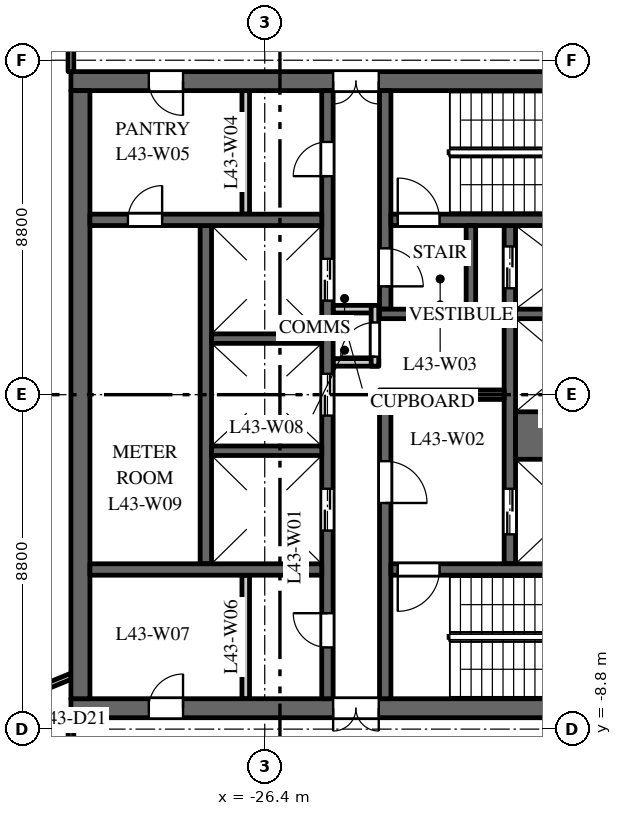
"""IFC4 building model, lengths in metres.
Left out: names, types, materials, properties, quantities, classifications, styles, units other than length and angle.
Written with IfcOpenShell. Run it as: python <this file> out.ifc"""

import sys

from ifc_helpers import new_model, si_unit, direction, frame, frame_2d, origin, place, context, subcontext, project, spatial, rectangle, extrude, element, fill, save


model = new_model("IFC4")
c1 = context("Model", 3, precision=1e-05, world=origin(), true_north=direction((0.0, 1.0)))
c2 = subcontext(c1, "Body", "Model", "MODEL_VIEW")
j1 = project(units=[si_unit("LENGTHUNIT", "METRE"), si_unit("PLANEANGLEUNIT", "RADIAN")], contexts=[c1])
p1 = place(None, origin())
s1 = spatial("IfcSite", under=j1, at=p1, CompositionType="ELEMENT")
p2 = place(p1, origin())
s2 = spatial("IfcBuilding", under=s1, at=p2, CompositionType="ELEMENT")
p3 = place(p2, frame((0.0, 0.0, 186.0)))
s3 = spatial("IfcBuildingStorey", under=s2, at=p3, CompositionType="ELEMENT", Elevation=186.0)
p4 = place(p3, frame((-16.5, 8.25, 0.0), z_axis=(0.0, 0.0, 1.0), x_axis=(-1.0, 0.0, 0.0)))
e1 = element("IfcWall", 1, at=p4, inside=s3, PredefinedType="SHEAR", context=c2, shape_type="SweptSolid", body=[
    extrude(rectangle(XDim=15.0, YDim=0.5, at=frame_2d((7.5, 0.0))), origin(), (0.0, 0.0, 1.0), 3.7),
])
p5 = place(p4, frame((6.9, 0.0, 0.0)))
e2 = element("IfcOpeningElement", 2, at=p5, cuts=e1, PredefinedType="OPENING", context=c2, shape_type="SweptSolid", body=[
    extrude(rectangle(XDim=1.2, YDim=2.1, at=frame_2d((0.6, 1.05))), frame((0.0, 0.26, 0.0), z_axis=(0.0, -1.0, 0.0), x_axis=(1.0, 0.0, 0.0)), (0.0, 0.0, 1.0), 0.52),
])
p6 = place(p4, frame((12.05, 0.0, 0.0)))
e3 = element("IfcOpeningElement", 3, at=p6, cuts=e1, PredefinedType="OPENING", context=c2, shape_type="SweptSolid", body=[
    extrude(rectangle(XDim=0.9, YDim=2.1, at=frame_2d((0.45, 1.05))), frame((0.0, 0.26, 0.0), z_axis=(0.0, -1.0, 0.0), x_axis=(1.0, 0.0, 0.0)), (0.0, 0.0, 1.0), 0.52),
])
p7 = place(p3, frame((-16.5, -8.25, 0.0), z_axis=(0.0, 0.0, 1.0), x_axis=(-1.0, 0.0, 0.0)))
e4 = element("IfcWall", 4, at=p7, inside=s3, PredefinedType="SHEAR", context=c2, shape_type="SweptSolid", body=[
    extrude(rectangle(XDim=15.0, YDim=0.5, at=frame_2d((7.5, 0.0))), origin(), (0.0, 0.0, 1.0), 3.7),
])
p8 = place(p7, frame((6.9, 0.0, 0.0)))
e5 = element("IfcOpeningElement", 5, at=p8, cuts=e4, PredefinedType="OPENING", context=c2, shape_type="SweptSolid", body=[
    extrude(rectangle(XDim=1.2, YDim=2.1, at=frame_2d((0.6, 1.05))), frame((0.0, 0.26, 0.0), z_axis=(0.0, -1.0, 0.0), x_axis=(1.0, 0.0, 0.0)), (0.0, 0.0, 1.0), 0.52),
])
p9 = place(p7, frame((12.05, 0.0, 0.0)))
e6 = element("IfcOpeningElement", 6, at=p9, cuts=e4, PredefinedType="OPENING", context=c2, shape_type="SweptSolid", body=[
    extrude(rectangle(XDim=0.9, YDim=2.1, at=frame_2d((0.45, 1.05))), frame((0.0, 0.26, 0.0), z_axis=(0.0, -1.0, 0.0), x_axis=(1.0, 0.0, 0.0)), (0.0, 0.0, 1.0), 0.52),
])
p10 = place(p3, frame((-27.95, -4.45, 0.0), z_axis=(0.0, 0.0, 1.0), x_axis=(0.0, 1.0, 0.0)))
e7 = element("IfcWall", 7, at=p10, inside=s3, PredefinedType="SHEAR", context=c2, shape_type="SweptSolid", body=[
    extrude(rectangle(XDim=8.9, YDim=0.3, at=frame_2d((4.45, 0.0))), origin(), (0.0, 0.0, 1.0), 3.7),
])
p11 = place(p3, frame((-19.95, -4.45, 0.0), z_axis=(0.0, 0.0, 1.0), x_axis=(0.0, 1.0, 0.0)))
e8 = element("IfcWall", 8, at=p11, inside=s3, PredefinedType="SHEAR", context=c2, shape_type="SweptSolid", body=[
    extrude(rectangle(XDim=8.9, YDim=0.3, at=frame_2d((4.45, 0.0))), origin(), (0.0, 0.0, 1.0), 3.7),
])
p12 = place(p11, frame((0.775, 0.0, 0.0)))
e9 = element("IfcOpeningElement", 9, at=p12, cuts=e8, PredefinedType="OPENING", context=c2, shape_type="SweptSolid", body=[
    extrude(rectangle(XDim=1.2, YDim=2.1, at=frame_2d((0.6, 1.05))), frame((0.0, 0.16, 0.0), z_axis=(0.0, -1.0, 0.0), x_axis=(1.0, 0.0, 0.0)), (0.0, 0.0, 1.0), 0.32),
])
p13 = place(p11, frame((7.25, 0.0, 0.0)))
e10 = element("IfcOpeningElement", 10, at=p13, cuts=e8, PredefinedType="OPENING", context=c2, shape_type="SweptSolid", body=[
    extrude(rectangle(XDim=1.1, YDim=2.1, at=frame_2d((0.55, 1.05))), frame((0.0, 0.16, 0.0), z_axis=(0.0, -1.0, 0.0), x_axis=(1.0, 0.0, 0.0)), (0.0, 0.0, 1.0), 0.32),
])
p14 = place(p3, frame((-24.75, -8.0, 0.0), z_axis=(0.0, 0.0, 1.0), x_axis=(0.0, 1.0, 0.0)))
e11 = element("IfcWall", 11, at=p14, inside=s3, PredefinedType="SHEAR", context=c2, shape_type="SweptSolid", body=[
    extrude(rectangle(XDim=16.0, YDim=0.3, at=frame_2d((8.0, 0.0))), origin(), (0.0, 0.0, 1.0), 3.7),
])
p15 = place(p14, frame((4.425, 0.0, 0.0)))
e12 = element("IfcOpeningElement", 12, at=p15, cuts=e11, PredefinedType="OPENING", context=c2, shape_type="SweptSolid", body=[
    extrude(rectangle(XDim=1.1, YDim=2.1, at=frame_2d((0.55, 1.05))), frame((0.0, 0.16, 0.0), z_axis=(0.0, -1.0, 0.0), x_axis=(1.0, 0.0, 0.0)), (0.0, 0.0, 1.0), 0.32),
])
p16 = place(p14, frame((7.45, 0.0, 0.0)))
e13 = element("IfcOpeningElement", 13, at=p16, cuts=e11, PredefinedType="OPENING", context=c2, shape_type="SweptSolid", body=[
    extrude(rectangle(XDim=1.1, YDim=2.1, at=frame_2d((0.55, 1.05))), frame((0.0, 0.16, 0.0), z_axis=(0.0, -1.0, 0.0), x_axis=(1.0, 0.0, 0.0)), (0.0, 0.0, 1.0), 0.32),
])
p17 = place(p14, frame((10.475, 0.0, 0.0)))
e14 = element("IfcOpeningElement", 14, at=p17, cuts=e11, PredefinedType="OPENING", context=c2, shape_type="SweptSolid", body=[
    extrude(rectangle(XDim=1.1, YDim=2.1, at=frame_2d((0.55, 1.05))), frame((0.0, 0.16, 0.0), z_axis=(0.0, -1.0, 0.0), x_axis=(1.0, 0.0, 0.0)), (0.0, 0.0, 1.0), 0.32),
])
p18 = place(p14, frame((13.75, 0.0, 0.0)))
e15 = element("IfcOpeningElement", 15, at=p18, cuts=e11, PredefinedType="OPENING", context=c2, shape_type="SweptSolid", body=[
    extrude(rectangle(XDim=0.9, YDim=2.1, at=frame_2d((0.45, 1.05))), frame((0.0, 0.16, 0.0), z_axis=(0.0, -1.0, 0.0), x_axis=(1.0, 0.0, 0.0)), (0.0, 0.0, 1.0), 0.32),
])
p19 = place(p14, frame((1.35, 0.0, 0.0)))
e16 = element("IfcOpeningElement", 16, at=p19, cuts=e11, PredefinedType="OPENING", context=c2, shape_type="SweptSolid", body=[
    extrude(rectangle(XDim=0.9, YDim=2.1, at=frame_2d((0.45, 1.05))), frame((0.0, 0.16, 0.0), z_axis=(0.0, -1.0, 0.0), x_axis=(1.0, 0.0, 0.0)), (0.0, 0.0, 1.0), 0.32),
])
p20 = place(p3, frame((-20.1, 0.0, 0.0), z_axis=(0.0, 0.0, 1.0), x_axis=(-1.0, 0.0, 0.0)))
e17 = element("IfcWall", 17, at=p20, inside=s3, PredefinedType="SHEAR", context=c2, shape_type="SweptSolid", body=[
    extrude(rectangle(XDim=3.28, YDim=0.25, at=frame_2d((1.64, 0.0))), origin(), (0.0, 0.0, 1.0), 3.7),
])
for number, where, z_axis, x_axis in (
    (18, (-23.4, 0.85, 0.0), (0.0, 0.0, 1.0), (-1.0, 0.0, 0.0)),
    (19, (-23.4, 2.25, 0.0), (0.0, 0.0, 1.0), (-1.0, 0.0, 0.0)),
):
    element("IfcWall", number, at=place(p3, frame(where, z_axis=z_axis, x_axis=x_axis)), inside=s3, PredefinedType="PARTITIONING", context=c2, shape_type="SweptSolid", body=[
        extrude(rectangle(XDim=1.2, YDim=0.2, at=frame_2d((0.6, 0.0))), origin(), (0.0, 0.0, 1.0), 3.7),
    ])
p21 = place(p3, frame((-23.5, 0.75, 0.0), z_axis=(0.0, 0.0, 1.0), x_axis=(0.0, 1.0, 0.0)))
e20 = element("IfcWall", 20, at=p21, inside=s3, PredefinedType="PARTITIONING", context=c2, shape_type="SweptSolid", body=[
    extrude(rectangle(XDim=1.6, YDim=0.2, at=frame_2d((0.8, 0.0))), origin(), (0.0, 0.0, 1.0), 3.7),
])
p22 = place(p21, frame((0.25, 0.0, 0.0)))
e21 = element("IfcOpeningElement", 21, at=p22, cuts=e20, PredefinedType="OPENING", context=c2, shape_type="SweptSolid", body=[
    extrude(rectangle(XDim=0.9, YDim=2.1, at=frame_2d((0.45, 1.05))), frame((0.0, 0.11, 0.0), z_axis=(0.0, -1.0, 0.0), x_axis=(1.0, 0.0, 0.0)), (0.0, 0.0, 1.0), 0.22),
])
p23 = place(p3, frame((-31.25, -8.0, 0.0), z_axis=(0.0, 0.0, 1.0), x_axis=(0.0, 1.0, 0.0)))
e22 = element("IfcWall", 22, at=p23, inside=s3, PredefinedType="SHEAR", context=c2, shape_type="SweptSolid", body=[
    extrude(rectangle(XDim=16.0, YDim=0.5, at=frame_2d((8.0, 0.0))), origin(), (0.0, 0.0, 1.0), 3.7),
])
p24 = place(p3, frame((-24.9, 4.6, 0.0), z_axis=(0.0, 0.0, 1.0), x_axis=(-1.0, 0.0, 0.0)))
e23 = element("IfcWall", 23, at=p24, inside=s3, PredefinedType="SHEAR", context=c2, shape_type="SweptSolid", body=[
    extrude(rectangle(XDim=6.1, YDim=0.3, at=frame_2d((3.05, 0.0))), origin(), (0.0, 0.0, 1.0), 3.7),
])
p25 = place(p24, frame((4.2, 0.0, 0.0)))
e24 = element("IfcOpeningElement", 24, at=p25, cuts=e23, PredefinedType="OPENING", context=c2, shape_type="SweptSolid", body=[
    extrude(rectangle(XDim=0.9, YDim=2.1, at=frame_2d((0.45, 1.05))), frame((0.0, 0.16, 0.0), z_axis=(0.0, -1.0, 0.0), x_axis=(1.0, 0.0, 0.0)), (0.0, 0.0, 1.0), 0.32),
])
for number, where, z_axis, x_axis in (
    (25, (-26.9, 4.75, 0.0), (0.0, 0.0, 1.0), (0.0, 1.0, 0.0)),
    (26, (-26.9, -8.0, 0.0), (0.0, 0.0, 1.0), (0.0, 1.0, 0.0)),
):
    element("IfcWall", number, at=place(p3, frame(where, z_axis=z_axis, x_axis=x_axis)), inside=s3, PredefinedType="PARTITIONING", context=c2, shape_type="SweptSolid", body=[
        extrude(rectangle(XDim=3.25, YDim=0.2, at=frame_2d((1.625, 0.0))), origin(), (0.0, 0.0, 1.0), 3.7),
    ])
p26 = place(p3, frame((-24.9, -4.6, 0.0), z_axis=(0.0, 0.0, 1.0), x_axis=(-1.0, 0.0, 0.0)))
e27 = element("IfcWall", 27, at=p26, inside=s3, PredefinedType="SHEAR", context=c2, shape_type="SweptSolid", body=[
    extrude(rectangle(XDim=6.1, YDim=0.3, at=frame_2d((3.05, 0.0))), origin(), (0.0, 0.0, 1.0), 3.7),
])
p27 = place(p3, frame((-16.9, -1.075, 0.0), z_axis=(0.0, 0.0, 1.0), x_axis=(-1.0, 0.0, 0.0)))
e28 = element("IfcWall", 28, at=p27, inside=s3, PredefinedType="SHEAR", context=c2, shape_type="SweptSolid", body=[
    extrude(rectangle(XDim=2.9, YDim=1.25, at=frame_2d((1.45, 0.0))), origin(), (0.0, 0.0, 1.0), 3.7),
])
for number, where, z_axis, x_axis in (
    (29, (-16.9, 2.125, 0.0), (0.0, 0.0, 1.0), (-1.0, 0.0, 0.0)),
    (30, (-24.9, -1.475, 0.0), (0.0, 0.0, 1.0), (-1.0, 0.0, 0.0)),
    (31, (-24.9, 1.475, 0.0), (0.0, 0.0, 1.0), (-1.0, 0.0, 0.0)),
):
    element("IfcWall", number, at=place(p3, frame(where, z_axis=z_axis, x_axis=x_axis)), inside=s3, PredefinedType="SHEAR", context=c2, shape_type="SweptSolid", body=[
        extrude(rectangle(XDim=2.9, YDim=0.25, at=frame_2d((1.45, 0.0))), origin(), (0.0, 0.0, 1.0), 3.7),
    ])
p28 = place(p3, frame((-23.23, 2.25, 0.0), z_axis=(0.0, 0.0, 1.0), x_axis=(0.0, 1.0, 0.0)))
e32 = element("IfcWall", 32, at=p28, inside=s3, PredefinedType="SHEAR", context=c2, shape_type="SweptSolid", body=[
    extrude(rectangle(XDim=5.75, YDim=0.3, at=frame_2d((2.875, 0.0))), origin(), (0.0, 0.0, 1.0), 3.7),
])
p29 = place(p28, frame((0.6, 0.0, 0.0)))
e33 = element("IfcOpeningElement", 33, at=p29, cuts=e32, PredefinedType="OPENING", context=c2, shape_type="SweptSolid", body=[
    extrude(rectangle(XDim=1.0, YDim=2.1, at=frame_2d((0.5, 1.05))), frame((0.0, 0.16, 0.0), z_axis=(0.0, -1.0, 0.0), x_axis=(1.0, 0.0, 0.0)), (0.0, 0.0, 1.0), 0.32),
])
p30 = place(p3, frame((-23.23, -8.0, 0.0), z_axis=(0.0, 0.0, 1.0), x_axis=(0.0, 1.0, 0.0)))
e34 = element("IfcWall", 34, at=p30, inside=s3, PredefinedType="SHEAR", context=c2, shape_type="SweptSolid", body=[
    extrude(rectangle(XDim=7.875, YDim=0.3, at=frame_2d((3.938, 0.0))), origin(), (0.0, 0.0, 1.0), 3.7),
])
p31 = place(p30, frame((5.15, 0.0, 0.0)))
e35 = element("IfcOpeningElement", 35, at=p31, cuts=e34, PredefinedType="OPENING", context=c2, shape_type="SweptSolid", body=[
    extrude(rectangle(XDim=1.1, YDim=2.1, at=frame_2d((0.55, 1.05))), frame((0.0, 0.16, 0.0), z_axis=(0.0, -1.0, 0.0), x_axis=(1.0, 0.0, 0.0)), (0.0, 0.0, 1.0), 0.32),
])
p32 = place(p3, frame((-16.9, 4.6, 0.0), z_axis=(0.0, 0.0, 1.0), x_axis=(-1.0, 0.0, 0.0)))
e36 = element("IfcWall", 36, at=p32, inside=s3, PredefinedType="SHEAR", context=c2, shape_type="SweptSolid", body=[
    extrude(rectangle(XDim=6.18, YDim=0.3, at=frame_2d((3.09, 0.0))), origin(), (0.0, 0.0, 1.0), 3.7),
])
p33 = place(p32, frame((4.9, 0.0, 0.0)))
e37 = element("IfcOpeningElement", 37, at=p33, cuts=e36, PredefinedType="OPENING", context=c2, shape_type="SweptSolid", body=[
    extrude(rectangle(XDim=1.1, YDim=2.1, at=frame_2d((0.55, 1.05))), frame((0.0, 0.16, 0.0), z_axis=(0.0, -1.0, 0.0), x_axis=(1.0, 0.0, 0.0)), (0.0, 0.0, 1.0), 0.32),
])
p34 = place(p3, frame((-16.9, -4.6, 0.0), z_axis=(0.0, 0.0, 1.0), x_axis=(-1.0, 0.0, 0.0)))
e38 = element("IfcWall", 38, at=p34, inside=s3, PredefinedType="SHEAR", context=c2, shape_type="SweptSolid", body=[
    extrude(rectangle(XDim=6.18, YDim=0.3, at=frame_2d((3.09, 0.0))), origin(), (0.0, 0.0, 1.0), 3.7),
])
p35 = place(p34, frame((4.9, 0.0, 0.0)))
e39 = element("IfcOpeningElement", 39, at=p35, cuts=e38, PredefinedType="OPENING", context=c2, shape_type="SweptSolid", body=[
    extrude(rectangle(XDim=1.1, YDim=2.1, at=frame_2d((0.55, 1.05))), frame((0.0, 0.16, 0.0), z_axis=(0.0, -1.0, 0.0), x_axis=(1.0, 0.0, 0.0)), (0.0, 0.0, 1.0), 0.32),
])
p36 = place(p3, frame((-20.85, 2.125, 0.0), z_axis=(0.0, 0.0, 1.0), x_axis=(-1.0, 0.0, 0.0)))
e40 = element("IfcWall", 40, at=p36, inside=s3, PredefinedType="SHEAR", context=c2, shape_type="SweptSolid", body=[
    extrude(rectangle(XDim=2.53, YDim=0.25, at=frame_2d((1.265, 0.0))), origin(), (0.0, 0.0, 1.0), 3.7),
])
p37 = place(p3, frame((-20.975, 2.25, 0.0), z_axis=(0.0, 0.0, 1.0), x_axis=(0.0, 1.0, 0.0)))
e41 = element("IfcWall", 41, at=p37, inside=s3, PredefinedType="SHEAR", context=c2, shape_type="SweptSolid", body=[
    extrude(rectangle(XDim=2.2, YDim=0.25, at=frame_2d((1.1, 0.0))), origin(), (0.0, 0.0, 1.0), 3.7),
])
p38 = place(p3, frame((-34.234, -8.53, 0.0), z_axis=(0.0, 0.0, 1.0), x_axis=(0.925344112436, 0.379128307542, 0.0)))
e42 = element("IfcWall", 42, at=p38, inside=s3, PredefinedType="PARTITIONING", context=c2, shape_type="SweptSolid", body=[
    extrude(rectangle(XDim=2.954, YDim=0.15, at=frame_2d((1.477, 0.0))), origin(), (0.0, 0.0, 1.0), 2.9),
])
p39 = place(p3, frame((-31.5, -10.7, 0.0), z_axis=(0.0, 0.0, 1.0), x_axis=(0.0, 1.0, 0.0)))
e43 = element("IfcWall", 43, at=p39, inside=s3, PredefinedType="PARTITIONING", context=c2, shape_type="SweptSolid", body=[
    extrude(rectangle(XDim=2.2, YDim=0.15, at=frame_2d((1.1, 0.0))), origin(), (0.0, 0.0, 1.0), 3.7),
])
p40 = place(p39, frame((0.55, 0.0, 0.0)))
e44 = element("IfcOpeningElement", 44, at=p40, cuts=e43, PredefinedType="OPENING", context=c2, shape_type="SweptSolid", body=[
    extrude(rectangle(XDim=1.0, YDim=2.1, at=frame_2d((0.5, 1.05))), frame((0.0, 0.085, 0.0), z_axis=(0.0, -1.0, 0.0), x_axis=(1.0, 0.0, 0.0)), (0.0, 0.0, 1.0), 0.17),
])
p41 = place(p3, frame((-31.5, 8.5, 0.0), z_axis=(0.0, 0.0, 1.0), x_axis=(0.0, 1.0, 0.0)))
e45 = element("IfcWall", 45, at=p41, inside=s3, PredefinedType="PARTITIONING", context=c2, shape_type="SweptSolid", body=[
    extrude(rectangle(XDim=2.2, YDim=0.15, at=frame_2d((1.1, 0.0))), origin(), (0.0, 0.0, 1.0), 3.7),
])
p42 = place(p12, origin())
e46 = element("IfcDoor", 46, at=p42, inside=s3, OperationType="DOUBLE_DOOR_SLIDING", PredefinedType="DOOR", context=c2, shape_type="SweptSolid", body=[
    extrude(rectangle(XDim=1.2, YDim=2.1, at=frame_2d((0.6, 1.05))), frame((0.0, 0.025, 0.0), z_axis=(0.0, -1.0, 0.0), x_axis=(1.0, 0.0, 0.0)), (0.0, 0.0, 1.0), 0.05),
])
fill(e9, e46)
p43 = place(p13, origin())
e47 = element("IfcDoor", 47, at=p43, inside=s3, OperationType="DOUBLE_DOOR_SLIDING", PredefinedType="DOOR", context=c2, shape_type="SweptSolid", body=[
    extrude(rectangle(XDim=1.1, YDim=2.1, at=frame_2d((0.55, 1.05))), frame((0.0, 0.025, 0.0), z_axis=(0.0, -1.0, 0.0), x_axis=(1.0, 0.0, 0.0)), (0.0, 0.0, 1.0), 0.05),
])
fill(e10, e47)
p44 = place(p15, origin())
e48 = element("IfcDoor", 48, at=p44, inside=s3, OperationType="DOUBLE_DOOR_SLIDING", PredefinedType="DOOR", context=c2, shape_type="SweptSolid", body=[
    extrude(rectangle(XDim=1.1, YDim=2.1, at=frame_2d((0.55, 1.05))), frame((0.0, 0.025, 0.0), z_axis=(0.0, -1.0, 0.0), x_axis=(1.0, 0.0, 0.0)), (0.0, 0.0, 1.0), 0.05),
])
fill(e12, e48)
p45 = place(p16, origin())
e49 = element("IfcDoor", 49, at=p45, inside=s3, OperationType="DOUBLE_DOOR_SLIDING", PredefinedType="DOOR", context=c2, shape_type="SweptSolid", body=[
    extrude(rectangle(XDim=1.1, YDim=2.1, at=frame_2d((0.55, 1.05))), frame((0.0, 0.025, 0.0), z_axis=(0.0, -1.0, 0.0), x_axis=(1.0, 0.0, 0.0)), (0.0, 0.0, 1.0), 0.05),
])
fill(e13, e49)
p46 = place(p17, origin())
e50 = element("IfcDoor", 50, at=p46, inside=s3, OperationType="DOUBLE_DOOR_SLIDING", PredefinedType="DOOR", context=c2, shape_type="SweptSolid", body=[
    extrude(rectangle(XDim=1.1, YDim=2.1, at=frame_2d((0.55, 1.05))), frame((0.0, 0.025, 0.0), z_axis=(0.0, -1.0, 0.0), x_axis=(1.0, 0.0, 0.0)), (0.0, 0.0, 1.0), 0.05),
])
fill(e14, e50)
p47 = place(p33, origin())
e51 = element("IfcDoor", 51, at=p47, inside=s3, OperationType="SINGLE_SWING_RIGHT", PredefinedType="DOOR", context=c2, shape_type="SweptSolid", body=[
    extrude(rectangle(XDim=1.1, YDim=2.1, at=frame_2d((0.55, 1.05))), frame((0.0, 0.025, 0.0), z_axis=(0.0, -1.0, 0.0), x_axis=(1.0, 0.0, 0.0)), (0.0, 0.0, 1.0), 0.05),
])
fill(e37, e51)
p48 = place(p35, origin())
e52 = element("IfcDoor", 52, at=p48, inside=s3, OperationType="SINGLE_SWING_LEFT", PredefinedType="DOOR", context=c2, shape_type="SweptSolid", body=[
    extrude(rectangle(XDim=1.1, YDim=2.1, at=frame_2d((0.55, 1.05))), frame((0.0, 0.025, 0.0), z_axis=(0.0, -1.0, 0.0), x_axis=(1.0, 0.0, 0.0)), (0.0, 0.0, 1.0), 0.05),
])
fill(e39, e52)
p49 = place(p31, origin())
e53 = element("IfcDoor", 53, at=p49, inside=s3, OperationType="SINGLE_SWING_LEFT", PredefinedType="DOOR", context=c2, shape_type="SweptSolid", body=[
    extrude(rectangle(XDim=1.1, YDim=2.1, at=frame_2d((0.55, 1.05))), frame((0.0, 0.025, 0.0), z_axis=(0.0, -1.0, 0.0), x_axis=(1.0, 0.0, 0.0)), (0.0, 0.0, 1.0), 0.05),
])
fill(e35, e53)
p50 = place(p29, origin())
e54 = element("IfcDoor", 54, at=p50, inside=s3, OperationType="SINGLE_SWING_LEFT", PredefinedType="DOOR", context=c2, shape_type="SweptSolid", body=[
    extrude(rectangle(XDim=1.0, YDim=2.1, at=frame_2d((0.5, 1.05))), frame((0.0, 0.025, 0.0), z_axis=(0.0, -1.0, 0.0), x_axis=(1.0, 0.0, 0.0)), (0.0, 0.0, 1.0), 0.05),
])
fill(e33, e54)
p51 = place(p5, origin())
e55 = element("IfcDoor", 55, at=p51, inside=s3, OperationType="DOUBLE_DOOR_DOUBLE_SWING", PredefinedType="DOOR", context=c2, shape_type="SweptSolid", body=[
    extrude(rectangle(XDim=1.2, YDim=2.1, at=frame_2d((0.6, 1.05))), frame((0.0, 0.025, 0.0), z_axis=(0.0, -1.0, 0.0), x_axis=(1.0, 0.0, 0.0)), (0.0, 0.0, 1.0), 0.05),
])
fill(e2, e55)
p52 = place(p8, origin())
e56 = element("IfcDoor", 56, at=p52, inside=s3, OperationType="DOUBLE_DOOR_DOUBLE_SWING", PredefinedType="DOOR", context=c2, shape_type="SweptSolid", body=[
    extrude(rectangle(XDim=1.2, YDim=2.1, at=frame_2d((0.6, 1.05))), frame((0.0, 0.025, 0.0), z_axis=(0.0, -1.0, 0.0), x_axis=(1.0, 0.0, 0.0)), (0.0, 0.0, 1.0), 0.05),
])
fill(e5, e56)
p53 = place(p18, origin())
e57 = element("IfcDoor", 57, at=p53, inside=s3, OperationType="SINGLE_SWING_RIGHT", PredefinedType="DOOR", context=c2, shape_type="SweptSolid", body=[
    extrude(rectangle(XDim=0.9, YDim=2.1, at=frame_2d((0.45, 1.05))), frame((0.0, 0.025, 0.0), z_axis=(0.0, -1.0, 0.0), x_axis=(1.0, 0.0, 0.0)), (0.0, 0.0, 1.0), 0.05),
])
fill(e15, e57)
p54 = place(p6, origin())
e58 = element("IfcDoor", 58, at=p54, inside=s3, OperationType="SINGLE_SWING_RIGHT", PredefinedType="DOOR", context=c2, shape_type="SweptSolid", body=[
    extrude(rectangle(XDim=0.9, YDim=2.1, at=frame_2d((0.45, 1.05))), frame((0.0, 0.025, 0.0), z_axis=(0.0, -1.0, 0.0), x_axis=(1.0, 0.0, 0.0)), (0.0, 0.0, 1.0), 0.05),
])
fill(e3, e58)
p55 = place(p19, origin())
e59 = element("IfcDoor", 59, at=p55, inside=s3, OperationType="SINGLE_SWING_LEFT", PredefinedType="DOOR", context=c2, shape_type="SweptSolid", body=[
    extrude(rectangle(XDim=0.9, YDim=2.1, at=frame_2d((0.45, 1.05))), frame((0.0, 0.025, 0.0), z_axis=(0.0, -1.0, 0.0), x_axis=(1.0, 0.0, 0.0)), (0.0, 0.0, 1.0), 0.05),
])
fill(e16, e59)
p56 = place(p9, origin())
e60 = element("IfcDoor", 60, at=p56, inside=s3, OperationType="SINGLE_SWING_LEFT", PredefinedType="DOOR", context=c2, shape_type="SweptSolid", body=[
    extrude(rectangle(XDim=0.9, YDim=2.1, at=frame_2d((0.45, 1.05))), frame((0.0, 0.025, 0.0), z_axis=(0.0, -1.0, 0.0), x_axis=(1.0, 0.0, 0.0)), (0.0, 0.0, 1.0), 0.05),
])
fill(e6, e60)
p57 = place(p22, origin())
e61 = element("IfcDoor", 61, at=p57, inside=s3, OperationType="SINGLE_SWING_RIGHT", PredefinedType="DOOR", context=c2, shape_type="SweptSolid", body=[
    extrude(rectangle(XDim=0.9, YDim=2.1, at=frame_2d((0.45, 1.05))), frame((0.0, 0.025, 0.0), z_axis=(0.0, -1.0, 0.0), x_axis=(1.0, 0.0, 0.0)), (0.0, 0.0, 1.0), 0.05),
])
fill(e21, e61)
p58 = place(p25, origin())
e62 = element("IfcDoor", 62, at=p58, inside=s3, OperationType="SINGLE_SWING_LEFT", PredefinedType="DOOR", context=c2, shape_type="SweptSolid", body=[
    extrude(rectangle(XDim=0.9, YDim=2.1, at=frame_2d((0.45, 1.05))), frame((0.0, 0.025, 0.0), z_axis=(0.0, -1.0, 0.0), x_axis=(1.0, 0.0, 0.0)), (0.0, 0.0, 1.0), 0.05),
])
fill(e24, e62)
save(model, sys.argv[1])
